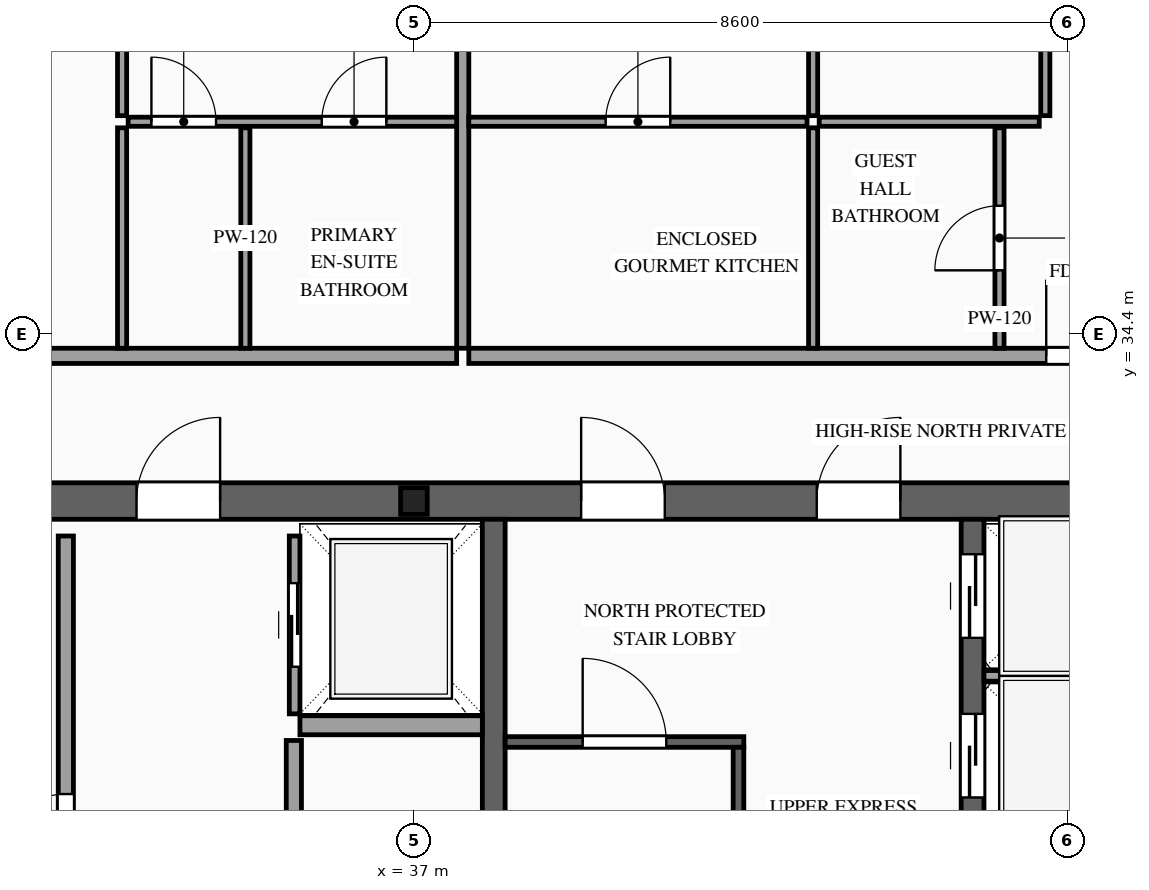
"""IFC4 building model, lengths in metres.
Left out: names, types, materials, properties, quantities, classifications, styles, units other than length and angle.
Written with IfcOpenShell. Run it as: python <this file> out.ifc"""

import sys

from ifc_helpers import new_model, si_unit, direction, frame, frame_2d, origin, origin_2d, place, context, subcontext, project, spatial, rectangle, i_section, extrude, source, transform, mapped, element, fill, save


model = new_model("IFC4")
c1 = context("Model", 3, precision=1e-05, world=origin(), true_north=direction((0.0, 1.0)))
c2 = subcontext(c1, "Body", "Model", "MODEL_VIEW")
j1 = project(units=[si_unit("LENGTHUNIT", "METRE"), si_unit("PLANEANGLEUNIT", "RADIAN")], contexts=[c1])
p1 = place(None, origin())
s1 = spatial("IfcSite", under=j1, at=p1, CompositionType="ELEMENT")
p2 = place(p1, origin())
s2 = spatial("IfcBuilding", under=s1, at=p2, CompositionType="ELEMENT")
p3 = place(p2, frame((0.0, 0.0, 285.6)))
s3 = spatial("IfcBuildingStorey", under=s2, at=p3, CompositionType="ELEMENT", Elevation=285.6)
p4 = place(p3, frame((23.56, 32.2, 0.0), z_axis=(0.0, 0.0, 1.0), x_axis=(1.0, 0.0, 0.0)))
e1 = element("IfcWall", 1, at=p4, inside=s3, PredefinedType="SHEAR", context=c2, shape_type="SweptSolid", body=[
    extrude(rectangle(XDim=26.88, YDim=0.48, at=frame_2d((13.44, 0.0))), origin(), (0.0, 0.0, 1.0), 3.5),
])
p5 = place(p4, frame((4.51, 0.0, 0.0)))
e2 = element("IfcOpeningElement", 2, at=p5, cuts=e1, PredefinedType="OPENING", context=c2, shape_type="SweptSolid", body=[
    extrude(rectangle(XDim=0.9, YDim=2.15, at=frame_2d((0.45, 1.075))), frame((0.0, 0.255, 0.0), z_axis=(0.0, -1.0, 0.0), x_axis=(1.0, 0.0, 0.0)), (0.0, 0.0, 1.0), 0.51),
])
p6 = place(p4, frame((9.79, 0.0, 0.0)))
e3 = element("IfcOpeningElement", 3, at=p6, cuts=e1, PredefinedType="OPENING", context=c2, shape_type="SweptSolid", body=[
    extrude(rectangle(XDim=1.1, YDim=2.2, at=frame_2d((0.55, 1.1))), frame((0.0, 0.255, 0.0), z_axis=(0.0, -1.0, 0.0), x_axis=(1.0, 0.0, 0.0)), (0.0, 0.0, 1.0), 0.51),
])
p7 = place(p4, frame((15.64, 0.0, 0.0)))
e4 = element("IfcOpeningElement", 4, at=p7, cuts=e1, PredefinedType="OPENING", context=c2, shape_type="SweptSolid", body=[
    extrude(rectangle(XDim=1.1, YDim=2.2, at=frame_2d((0.55, 1.1))), frame((0.0, 0.255, 0.0), z_axis=(0.0, -1.0, 0.0), x_axis=(1.0, 0.0, 0.0)), (0.0, 0.0, 1.0), 0.51),
])
p8 = place(p4, frame((18.74, 0.0, 0.0)))
e5 = element("IfcOpeningElement", 5, at=p8, cuts=e1, PredefinedType="OPENING", context=c2, shape_type="SweptSolid", body=[
    extrude(rectangle(XDim=1.1, YDim=2.2, at=frame_2d((0.55, 1.1))), frame((0.0, 0.255, 0.0), z_axis=(0.0, -1.0, 0.0), x_axis=(1.0, 0.0, 0.0)), (0.0, 0.0, 1.0), 0.51),
])
m1 = source(origin(), c2, "Body", "SweptSolid", [
    extrude(rectangle(XDim=12.32, YDim=0.3, at=frame_2d((6.16, 0.0))), origin(), (0.0, 0.0, 1.0), 3.5),
])
p9 = place(p3, frame((38.05, 19.64, 0.0), z_axis=(0.0, 0.0, 1.0), x_axis=(0.0, 1.0, 0.0)))
e6 = element("IfcWall", 6, at=p9, inside=s3, PredefinedType="SOLIDWALL", context=c2, shape_type="MappedRepresentation", body=[
    mapped(m1, transform((0.0, 0.0, 0.0), scale=1.0)),
])
p10 = place(p3, frame((44.35, 19.64, 0.0), z_axis=(0.0, 0.0, 1.0), x_axis=(0.0, 1.0, 0.0)))
e7 = element("IfcWall", 7, at=p10, inside=s3, PredefinedType="SOLIDWALL", context=c2, shape_type="SweptSolid", body=[
    extrude(rectangle(XDim=12.32, YDim=0.3, at=frame_2d((6.16, 0.0))), origin(), (0.0, 0.0, 1.0), 3.5),
])
p11 = place(p10, frame((6.56, 0.0, 0.0)))
e8 = element("IfcOpeningElement", 8, at=p11, cuts=e7, PredefinedType="OPENING", context=c2, shape_type="SweptSolid", body=[
    extrude(rectangle(XDim=1.1, YDim=2.2, at=frame_2d((0.55, 1.1))), frame((0.0, 0.165, 0.0), z_axis=(0.0, -1.0, 0.0), x_axis=(1.0, 0.0, 0.0)), (0.0, 0.0, 1.0), 0.33),
])
p12 = place(p10, frame((8.66, 0.0, 0.0)))
e9 = element("IfcOpeningElement", 9, at=p12, cuts=e7, PredefinedType="OPENING", context=c2, shape_type="SweptSolid", body=[
    extrude(rectangle(XDim=1.1, YDim=2.2, at=frame_2d((0.55, 1.1))), frame((0.0, 0.165, 0.0), z_axis=(0.0, -1.0, 0.0), x_axis=(1.0, 0.0, 0.0)), (0.0, 0.0, 1.0), 0.33),
])
p13 = place(p10, frame((10.76, 0.0, 0.0)))
e10 = element("IfcOpeningElement", 10, at=p13, cuts=e7, PredefinedType="OPENING", context=c2, shape_type="SweptSolid", body=[
    extrude(rectangle(XDim=1.1, YDim=2.2, at=frame_2d((0.55, 1.1))), frame((0.0, 0.165, 0.0), z_axis=(0.0, -1.0, 0.0), x_axis=(1.0, 0.0, 0.0)), (0.0, 0.0, 1.0), 0.33),
])
m2 = source(origin(), c2, "Body", "SweptSolid", [
    extrude(i_section(OverallWidth=0.35, OverallDepth=0.35, WebThickness=0.012, FlangeThickness=0.019, at=origin_2d()), origin(), (0.0, 0.0, 1.0), 3.5),
])
p14 = place(p3, frame((37.0, 32.2, 0.0), z_axis=(0.0, 0.0, 1.0), x_axis=(1.0, 0.0, 0.0)))
e11 = element("IfcColumn", 11, at=p14, inside=s3, PredefinedType="COLUMN", context=c2, shape_type="MappedRepresentation", body=[
    mapped(m2, transform((0.0, 0.0, 0.0), scale=1.0)),
])
p15 = place(p3, frame((35.43, 29.4, 0.0), z_axis=(0.0, 0.0, 1.0), x_axis=(0.0, 1.0, 0.0)))
e12 = element("IfcWall", 12, at=p15, inside=s3, PredefinedType="SOLIDWALL", context=c2, shape_type="SweptSolid", body=[
    extrude(rectangle(XDim=2.34, YDim=0.14, at=frame_2d((1.17, 0.0))), origin(), (0.0, 0.0, 1.0), 3.28),
])
p16 = place(p15, frame((0.62, 0.0, 0.0)))
e13 = element("IfcOpeningElement", 13, at=p16, cuts=e12, PredefinedType="OPENING", context=c2, shape_type="SweptSolid", body=[
    extrude(rectangle(XDim=1.1, YDim=2.2, at=frame_2d((0.55, 1.1))), frame((0.0, 0.085, 0.0), z_axis=(0.0, -1.0, 0.0), x_axis=(1.0, 0.0, 0.0)), (0.0, 0.0, 1.0), 0.17),
])
m3 = source(origin(), c2, "Body", "SweptSolid", [
    extrude(rectangle(XDim=2.4, YDim=0.25, at=frame_2d((1.2, 0.0))), origin(), (0.0, 0.0, 1.0), 3.28),
])
p17 = place(p3, frame((35.5, 29.25, 0.0), z_axis=(0.0, 0.0, 1.0), x_axis=(1.0, 0.0, 0.0)))
e14 = element("IfcWall", 14, at=p17, inside=s3, PredefinedType="SOLIDWALL", context=c2, shape_type="MappedRepresentation", body=[
    mapped(m3, transform((0.0, 0.0, 0.0), scale=1.0)),
])
m4 = source(origin(), c2, "Body", "SweptSolid", [
    extrude(rectangle(XDim=2.0, YDim=0.14, at=frame_2d((1.0, 0.0))), origin(), (0.0, 0.0, 1.0), 3.28),
])
p18 = place(p3, frame((44.5, 29.9, 0.0), z_axis=(0.0, 0.0, 1.0), x_axis=(1.0, 0.0, 0.0)))
e15 = element("IfcWall", 15, at=p18, inside=s3, PredefinedType="SOLIDWALL", context=c2, shape_type="MappedRepresentation", body=[
    mapped(m4, transform((0.0, 0.0, 0.0), scale=1.0)),
])
p19 = place(p3, frame((38.2, 29.03, 0.0), z_axis=(0.0, 0.0, 1.0), x_axis=(1.0, 0.0, 0.0)))
e16 = element("IfcWall", 16, at=p19, inside=s3, PredefinedType="SOLIDWALL", context=c2, shape_type="SweptSolid", body=[
    extrude(rectangle(XDim=3.14, YDim=0.14, at=frame_2d((1.57, 0.0))), origin(), (0.0, 0.0, 1.0), 3.28),
])
p20 = place(p19, frame((1.02, 0.0, 0.0)))
e17 = element("IfcOpeningElement", 17, at=p20, cuts=e16, PredefinedType="OPENING", context=c2, shape_type="SweptSolid", body=[
    extrude(rectangle(XDim=1.1, YDim=2.2, at=frame_2d((0.55, 1.1))), frame((0.0, 0.085, 0.0), z_axis=(0.0, -1.0, 0.0), x_axis=(1.0, 0.0, 0.0)), (0.0, 0.0, 1.0), 0.17),
])
m5 = source(origin(), c2, "Body", "SweptSolid", [
    extrude(rectangle(XDim=8.94, YDim=0.14, at=frame_2d((4.47, 0.0))), origin(), (0.0, 0.0, 1.0), 3.28),
])
p21 = place(p3, frame((41.27, 20.02, 0.0), z_axis=(0.0, 0.0, 1.0), x_axis=(0.0, 1.0, 0.0)))
e18 = element("IfcWall", 18, at=p21, inside=s3, PredefinedType="SOLIDWALL", context=c2, shape_type="MappedRepresentation", body=[
    mapped(m5, transform((0.0, 0.0, 0.0), scale=1.0)),
])
p22 = place(p3, frame((32.42, 24.05, 0.0), z_axis=(0.0, 0.0, 1.0), x_axis=(0.0, 1.0, 0.0)))
e19 = element("IfcWall", 19, at=p22, inside=s3, PredefinedType="PARTITIONING", context=c2, shape_type="SweptSolid", body=[
    extrude(rectangle(XDim=7.69, YDim=0.2, at=frame_2d((3.845, 0.0))), origin(), (0.0, 0.0, 1.0), 3.28),
])
p23 = place(p22, frame((3.395, 0.0, 0.0)))
e20 = element("IfcOpeningElement", 20, at=p23, cuts=e19, PredefinedType="OPENING", context=c2, shape_type="SweptSolid", body=[
    extrude(rectangle(XDim=0.9, YDim=2.15, at=frame_2d((0.45, 1.075))), frame((0.0, 0.115, 0.0), z_axis=(0.0, -1.0, 0.0), x_axis=(1.0, 0.0, 0.0)), (0.0, 0.0, 1.0), 0.23),
])
p24 = place(p3, frame((35.42, 19.86, 0.0), z_axis=(0.0, 0.0, 1.0), x_axis=(0.0, 1.0, 0.0)))
e21 = element("IfcWall", 21, at=p24, inside=s3, PredefinedType="PARTITIONING", context=c2, shape_type="SweptSolid", body=[
    extrude(rectangle(XDim=9.19, YDim=0.2, at=frame_2d((4.595, 0.0))), origin(), (0.0, 0.0, 1.0), 3.28),
])
p25 = place(p24, frame((4.145, 0.0, 0.0)))
e22 = element("IfcOpeningElement", 22, at=p25, cuts=e21, PredefinedType="OPENING", context=c2, shape_type="SweptSolid", body=[
    extrude(rectangle(XDim=0.9, YDim=2.15, at=frame_2d((0.45, 1.075))), frame((0.0, 0.115, 0.0), z_axis=(0.0, -1.0, 0.0), x_axis=(1.0, 0.0, 0.0)), (0.0, 0.0, 1.0), 0.23),
])
p26 = place(p3, frame((20.94, 34.11, 0.0), z_axis=(0.0, 0.0, 1.0), x_axis=(1.0, 0.0, 0.0)))
e23 = element("IfcWall", 23, at=p26, inside=s3, PredefinedType="PARTITIONING", context=c2, shape_type="SweptSolid", body=[
    extrude(rectangle(XDim=16.622, YDim=0.2, at=frame_2d((8.311, 0.0))), origin(), (0.0, 0.0, 1.0), 3.28),
])
p27 = place(p26, frame((9.611, 0.0, 0.0)))
e24 = element("IfcOpeningElement", 24, at=p27, cuts=e23, PredefinedType="OPENING", context=c2, shape_type="SweptSolid", body=[
    extrude(rectangle(XDim=1.0, YDim=2.2, at=frame_2d((0.5, 1.1))), frame((0.0, 0.115, 0.0), z_axis=(0.0, -1.0, 0.0), x_axis=(1.0, 0.0, 0.0)), (0.0, 0.0, 1.0), 0.23),
])
m6 = source(origin(), c2, "Body", "SweptSolid", [
    extrude(rectangle(XDim=10.54, YDim=0.16, at=frame_2d((5.27, 0.0))), origin(), (0.0, 0.0, 1.0), 3.28),
])
p28 = place(p3, frame((37.642, 34.21, 0.0), z_axis=(0.0, 0.0, 1.0), x_axis=(0.0, 1.0, 0.0)))
e25 = element("IfcWall", 25, at=p28, inside=s3, PredefinedType="PARTITIONING", context=c2, shape_type="MappedRepresentation", body=[
    mapped(m6, transform((0.0, 0.0, 0.0), scale=1.0)),
])
m7 = source(origin(), c2, "Body", "SweptSolid", [
    extrude(rectangle(XDim=2.9, YDim=0.12, at=frame_2d((1.45, 0.0))), origin(), (0.0, 0.0, 1.0), 3.28),
])
for number, where, z_axis, x_axis in (
    (26, (34.782, 34.21, 0.0), (0.0, 0.0, 1.0), (0.0, 1.0, 0.0)),
    (27, (33.16, 34.21, 0.0), (0.0, 0.0, 1.0), (0.0, 1.0, 0.0)),
):
    element("IfcWall", number, at=place(p3, frame(where, z_axis=z_axis, x_axis=x_axis)), inside=s3, PredefinedType="PARTITIONING", context=c2, shape_type="MappedRepresentation", body=[
        mapped(m7, transform((0.0, 0.0, 0.0), scale=1.0)),
    ])
p29 = place(p3, frame((33.24, 37.19, 0.0), z_axis=(0.0, 0.0, 1.0), x_axis=(1.0, 0.0, 0.0)))
e28 = element("IfcWall", 28, at=p29, inside=s3, PredefinedType="PARTITIONING", context=c2, shape_type="SweptSolid", body=[
    extrude(rectangle(XDim=4.322, YDim=0.12, at=frame_2d((2.161, 0.0))), origin(), (0.0, 0.0, 1.0), 3.28),
])
p30 = place(p29, frame((2.547, 0.0, 0.0)))
e29 = element("IfcOpeningElement", 29, at=p30, cuts=e28, PredefinedType="OPENING", context=c2, shape_type="SweptSolid", body=[
    extrude(rectangle(XDim=0.85, YDim=2.1, at=frame_2d((0.425, 1.05))), frame((0.0, 0.075, 0.0), z_axis=(0.0, -1.0, 0.0), x_axis=(1.0, 0.0, 0.0)), (0.0, 0.0, 1.0), 0.15),
])
p31 = place(p29, frame((0.306, 0.0, 0.0)))
e30 = element("IfcOpeningElement", 30, at=p31, cuts=e28, PredefinedType="OPENING", context=c2, shape_type="SweptSolid", body=[
    extrude(rectangle(XDim=0.85, YDim=2.1, at=frame_2d((0.425, 1.05))), frame((0.0, 0.075, 0.0), z_axis=(0.0, -1.0, 0.0), x_axis=(1.0, 0.0, 0.0)), (0.0, 0.0, 1.0), 0.15),
])
p32 = place(p3, frame((33.16, 37.27, 0.0), z_axis=(0.0, 0.0, 1.0), x_axis=(0.0, 1.0, 0.0)))
e31 = element("IfcWall", 31, at=p32, inside=s3, PredefinedType="PARTITIONING", context=c2, shape_type="SweptSolid", body=[
    extrude(rectangle(XDim=7.48, YDim=0.12, at=frame_2d((3.74, 0.0))), origin(), (0.0, 0.0, 1.0), 3.28),
])
p33 = place(p32, frame((3.29, 0.0, 0.0)))
e32 = element("IfcOpeningElement", 32, at=p33, cuts=e31, PredefinedType="OPENING", context=c2, shape_type="SweptSolid", body=[
    extrude(rectangle(XDim=0.9, YDim=2.15, at=frame_2d((0.45, 1.075))), frame((0.0, 0.075, 0.0), z_axis=(0.0, -1.0, 0.0), x_axis=(1.0, 0.0, 0.0)), (0.0, 0.0, 1.0), 0.15),
])
p34 = place(p3, frame((37.722, 34.11, 0.0), z_axis=(0.0, 0.0, 1.0), x_axis=(1.0, 0.0, 0.0)))
e33 = element("IfcWall", 33, at=p34, inside=s3, PredefinedType="PARTITIONING", context=c2, shape_type="SweptSolid", body=[
    extrude(rectangle(XDim=15.338, YDim=0.2, at=frame_2d((7.669, 0.0))), origin(), (0.0, 0.0, 1.0), 3.28),
])
p35 = place(p34, frame((7.597, 0.0, 0.0)))
e34 = element("IfcOpeningElement", 34, at=p35, cuts=e33, PredefinedType="OPENING", context=c2, shape_type="SweptSolid", body=[
    extrude(rectangle(XDim=1.0, YDim=2.2, at=frame_2d((0.5, 1.1))), frame((0.0, 0.115, 0.0), z_axis=(0.0, -1.0, 0.0), x_axis=(1.0, 0.0, 0.0)), (0.0, 0.0, 1.0), 0.23),
])
p36 = place(p3, frame((37.722, 37.19, 0.0), z_axis=(0.0, 0.0, 1.0), x_axis=(1.0, 0.0, 0.0)))
e35 = element("IfcWall", 35, at=p36, inside=s3, PredefinedType="PARTITIONING", context=c2, shape_type="SweptSolid", body=[
    extrude(rectangle(XDim=4.45, YDim=0.12, at=frame_2d((2.225, 0.0))), origin(), (0.0, 0.0, 1.0), 3.28),
])
p37 = place(p36, frame((1.8, 0.0, 0.0)))
e36 = element("IfcOpeningElement", 36, at=p37, cuts=e35, PredefinedType="OPENING", context=c2, shape_type="SweptSolid", body=[
    extrude(rectangle(XDim=0.85, YDim=2.1, at=frame_2d((0.425, 1.05))), frame((0.0, 0.075, 0.0), z_axis=(0.0, -1.0, 0.0), x_axis=(1.0, 0.0, 0.0)), (0.0, 0.0, 1.0), 0.15),
])
p38 = place(p3, frame((42.252, 34.21, 0.0), z_axis=(0.0, 0.0, 1.0), x_axis=(0.0, 1.0, 0.0)))
e37 = element("IfcWall", 37, at=p38, inside=s3, PredefinedType="PARTITIONING", context=c2, shape_type="MappedRepresentation", body=[
    mapped(m7, transform((0.0, 0.0, 0.0), scale=1.0)),
])
p39 = place(p3, frame((44.704, 34.21, 0.0), z_axis=(0.0, 0.0, 1.0), x_axis=(0.0, 1.0, 0.0)))
e38 = element("IfcWall", 38, at=p39, inside=s3, PredefinedType="PARTITIONING", context=c2, shape_type="SweptSolid", body=[
    extrude(rectangle(XDim=2.9, YDim=0.12, at=frame_2d((1.45, 0.0))), origin(), (0.0, 0.0, 1.0), 3.28),
])
p40 = place(p39, frame((1.025, 0.0, 0.0)))
e39 = element("IfcOpeningElement", 39, at=p40, cuts=e38, PredefinedType="OPENING", context=c2, shape_type="SweptSolid", body=[
    extrude(rectangle(XDim=0.85, YDim=2.1, at=frame_2d((0.425, 1.05))), frame((0.0, 0.075, 0.0), z_axis=(0.0, -1.0, 0.0), x_axis=(1.0, 0.0, 0.0)), (0.0, 0.0, 1.0), 0.15),
])
p41 = place(p3, frame((42.252, 37.27, 0.0), z_axis=(0.0, 0.0, 1.0), x_axis=(0.0, 1.0, 0.0)))
e40 = element("IfcWall", 40, at=p41, inside=s3, PredefinedType="PARTITIONING", context=c2, shape_type="SweptSolid", body=[
    extrude(rectangle(XDim=7.48, YDim=0.12, at=frame_2d((3.74, 0.0))), origin(), (0.0, 0.0, 1.0), 3.28),
])
p42 = place(p41, frame((3.29, 0.0, 0.0)))
e41 = element("IfcOpeningElement", 41, at=p42, cuts=e40, PredefinedType="OPENING", context=c2, shape_type="SweptSolid", body=[
    extrude(rectangle(XDim=0.9, YDim=2.15, at=frame_2d((0.45, 1.075))), frame((0.0, 0.075, 0.0), z_axis=(0.0, -1.0, 0.0), x_axis=(1.0, 0.0, 0.0)), (0.0, 0.0, 1.0), 0.15),
])
m8 = source(origin(), c2, "Body", "SweptSolid", [
    extrude(rectangle(XDim=2.895, YDim=0.12, at=frame_2d((1.448, 0.0))), origin(), (0.0, 0.0, 1.0), 3.28),
])
p43 = place(p3, frame((42.332, 37.19, 0.0), z_axis=(0.0, 0.0, 1.0), x_axis=(1.0, 0.0, 0.0)))
e42 = element("IfcWall", 42, at=p43, inside=s3, PredefinedType="PARTITIONING", context=c2, shape_type="MappedRepresentation", body=[
    mapped(m8, transform((0.0, 0.0, 0.0), scale=1.0)),
])
p44 = place(p3, frame((45.307, 37.27, 0.0), z_axis=(0.0, 0.0, 1.0), x_axis=(0.0, 1.0, 0.0)))
e43 = element("IfcWall", 43, at=p44, inside=s3, PredefinedType="PARTITIONING", context=c2, shape_type="SweptSolid", body=[
    extrude(rectangle(XDim=7.48, YDim=0.12, at=frame_2d((3.74, 0.0))), origin(), (0.0, 0.0, 1.0), 3.28),
])
p45 = place(p44, frame((3.29, 0.0, 0.0)))
e44 = element("IfcOpeningElement", 44, at=p45, cuts=e43, PredefinedType="OPENING", context=c2, shape_type="SweptSolid", body=[
    extrude(rectangle(XDim=0.9, YDim=2.15, at=frame_2d((0.45, 1.075))), frame((0.0, 0.075, 0.0), z_axis=(0.0, -1.0, 0.0), x_axis=(1.0, 0.0, 0.0)), (0.0, 0.0, 1.0), 0.15),
])
m9 = source(origin(), c2, "Body", "SweptSolid", [
    extrude(rectangle(XDim=1.1, YDim=2.2, at=frame_2d((0.55, 1.1))), frame((0.0, 0.025, 0.0), z_axis=(0.0, -1.0, 0.0), x_axis=(1.0, 0.0, 0.0)), (0.0, 0.0, 1.0), 0.05),
])
p46 = place(p16, origin())
e45 = element("IfcDoor", 45, at=p46, inside=s3, OperationType="SLIDING_TO_RIGHT", PredefinedType="DOOR", context=c2, shape_type="MappedRepresentation", body=[
    mapped(m9, transform((0.0, 0.0, 0.0), scale=1.0)),
])
fill(e13, e45)
p47 = place(p12, origin())
e46 = element("IfcDoor", 46, at=p47, inside=s3, OperationType="SLIDING_TO_RIGHT", PredefinedType="DOOR", context=c2, shape_type="MappedRepresentation", body=[
    mapped(m9, transform((0.0, 0.0, 0.0), scale=1.0)),
])
fill(e9, e46)
p48 = place(p13, origin())
e47 = element("IfcDoor", 47, at=p48, inside=s3, OperationType="SLIDING_TO_LEFT", PredefinedType="DOOR", context=c2, shape_type="MappedRepresentation", body=[
    mapped(m9, transform((0.0, 0.0, 0.0), scale=1.0)),
])
fill(e10, e47)
m10 = source(origin(), c2, "Body", "SweptSolid", [
    extrude(rectangle(XDim=1.1, YDim=2.2, at=frame_2d((0.55, 1.1))), frame((0.0, 0.025, 0.0), z_axis=(0.0, -1.0, 0.0), x_axis=(1.0, 0.0, 0.0)), (0.0, 0.0, 1.0), 0.05),
])
p49 = place(p20, origin())
e48 = element("IfcDoor", 48, at=p49, inside=s3, OperationType="SINGLE_SWING_LEFT", PredefinedType="DOOR", context=c2, shape_type="MappedRepresentation", body=[
    mapped(m10, transform((0.0, 0.0, 0.0), scale=1.0)),
])
fill(e17, e48)
p50 = place(p6, origin())
e49 = element("IfcDoor", 49, at=p50, inside=s3, OperationType="SINGLE_SWING_RIGHT", PredefinedType="DOOR", context=c2, shape_type="MappedRepresentation", body=[
    mapped(m10, transform((0.0, 0.0, 0.0), scale=1.0)),
])
fill(e3, e49)
p51 = place(p7, origin())
e50 = element("IfcDoor", 50, at=p51, inside=s3, OperationType="SINGLE_SWING_LEFT", PredefinedType="DOOR", context=c2, shape_type="MappedRepresentation", body=[
    mapped(m10, transform((0.0, 0.0, 0.0), scale=1.0)),
])
fill(e4, e50)
p52 = place(p8, origin())
e51 = element("IfcDoor", 51, at=p52, inside=s3, OperationType="SINGLE_SWING_RIGHT", PredefinedType="DOOR", context=c2, shape_type="MappedRepresentation", body=[
    mapped(m10, transform((0.0, 0.0, 0.0), scale=1.0)),
])
fill(e5, e51)
m11 = source(origin(), c2, "Body", "SweptSolid", [
    extrude(rectangle(XDim=0.9, YDim=2.15, at=frame_2d((0.45, 1.075))), frame((0.0, 0.025, 0.0), z_axis=(0.0, -1.0, 0.0), x_axis=(1.0, 0.0, 0.0)), (0.0, 0.0, 1.0), 0.05),
])
p53 = place(p23, origin())
e52 = element("IfcDoor", 52, at=p53, inside=s3, OperationType="SINGLE_SWING_LEFT", PredefinedType="DOOR", context=c2, shape_type="MappedRepresentation", body=[
    mapped(m11, transform((0.0, 0.0, 0.0), scale=1.0)),
])
fill(e20, e52)
m12 = source(origin(), c2, "Body", "SweptSolid", [
    extrude(rectangle(XDim=0.85, YDim=2.1, at=frame_2d((0.425, 1.05))), frame((0.0, 0.025, 0.0), z_axis=(0.0, -1.0, 0.0), x_axis=(1.0, 0.0, 0.0)), (0.0, 0.0, 1.0), 0.05),
])
p54 = place(p30, origin())
e53 = element("IfcDoor", 53, at=p54, inside=s3, OperationType="SINGLE_SWING_RIGHT", PredefinedType="DOOR", context=c2, shape_type="MappedRepresentation", body=[
    mapped(m12, transform((0.0, 0.0, 0.0), scale=1.0)),
])
fill(e29, e53)
p55 = place(p31, origin())
e54 = element("IfcDoor", 54, at=p55, inside=s3, OperationType="SINGLE_SWING_LEFT", PredefinedType="DOOR", context=c2, shape_type="MappedRepresentation", body=[
    mapped(m12, transform((0.0, 0.0, 0.0), scale=1.0)),
])
fill(e30, e54)
m13 = source(origin(), c2, "Body", "SweptSolid", [
    extrude(rectangle(XDim=1.0, YDim=2.2, at=frame_2d((0.5, 1.1))), frame((0.0, 0.025, 0.0), z_axis=(0.0, -1.0, 0.0), x_axis=(1.0, 0.0, 0.0)), (0.0, 0.0, 1.0), 0.05),
])
p56 = place(p35, origin())
e55 = element("IfcDoor", 55, at=p56, inside=s3, OperationType="SINGLE_SWING_LEFT", PredefinedType="DOOR", context=c2, shape_type="MappedRepresentation", body=[
    mapped(m13, transform((0.0, 0.0, 0.0), scale=1.0)),
])
fill(e34, e55)
p57 = place(p37, origin())
e56 = element("IfcDoor", 56, at=p57, inside=s3, OperationType="SINGLE_SWING_RIGHT", PredefinedType="DOOR", context=c2, shape_type="MappedRepresentation", body=[
    mapped(m12, transform((0.0, 0.0, 0.0), scale=1.0)),
])
fill(e36, e56)
p58 = place(p40, origin())
e57 = element("IfcDoor", 57, at=p58, inside=s3, OperationType="SINGLE_SWING_LEFT", PredefinedType="DOOR", context=c2, shape_type="MappedRepresentation", body=[
    mapped(m12, transform((0.0, 0.0, 0.0), scale=1.0)),
])
fill(e39, e57)
save(model, sys.argv[1])
